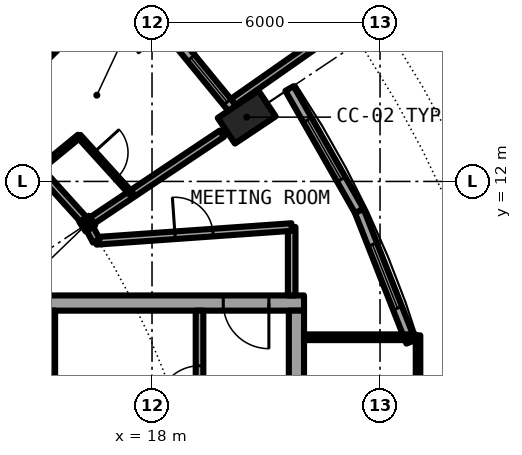
"""IFC4 building model, lengths in metres.
Left out: names, types, materials, properties, quantities, classifications, styles, units other than length and angle.
Written with IfcOpenShell. Run it as: python <this file> out.ifc"""

import sys

from ifc_helpers import new_model, si_unit, direction, frame, frame_2d, origin, origin_2d, place, context, subcontext, project, spatial, rectangle, hollow_circle, i_section, extrude, element, fill, save


model = new_model("IFC4")
c1 = context("Model", 3, precision=1e-05, world=origin(), true_north=direction((0.0, 1.0)))
c2 = subcontext(c1, "Body", "Model", "MODEL_VIEW")
j1 = project(units=[si_unit("LENGTHUNIT", "METRE"), si_unit("PLANEANGLEUNIT", "RADIAN")], contexts=[c1])
p1 = place(None, origin())
s1 = spatial("IfcSite", under=j1, at=p1, CompositionType="ELEMENT")
p2 = place(p1, origin())
s2 = spatial("IfcBuilding", under=s1, at=p2, CompositionType="ELEMENT")
p3 = place(p2, frame((0.0, 0.0, 243.2)))
s3 = spatial("IfcBuildingStorey", under=s2, at=p3, CompositionType="ELEMENT", Elevation=243.2)
p4 = place(p3, frame((21.027, 14.05, 0.242), z_axis=(-0.346875102267, -0.231750495433, 0.908828570905), x_axis=(0.555530396269, -0.831496228988, 0.0)))
e1 = element("IfcColumn", 1, at=p4, inside=s3, PredefinedType="COLUMN", context=c2, shape_type="SweptSolid", body=[
    extrude(hollow_circle(Radius=0.406, WallThickness=0.03, at=origin_2d()), origin(), (0.0, 0.0, 1.0), 3.09),
])
p5 = place(p3, frame((16.297, 10.889, 0.0), z_axis=(0.0, 0.0, 1.0), x_axis=(0.831469612303, 0.55557023302, 0.0)))
e2 = element("IfcColumn", 2, at=p5, inside=s3, PredefinedType="COLUMN", context=c2, shape_type="SweptSolid", body=[
    extrude(i_section(OverallWidth=0.3, OverallDepth=0.3, WebThickness=0.011, FlangeThickness=0.019, FilletRadius=0.027, at=origin_2d()), origin(), (0.0, 0.0, 1.0), 3.05),
])
p6 = place(p3, frame((20.371, 13.611, 0.0), z_axis=(0.0, 0.0, 1.0), x_axis=(-0.634396836208, 0.773007538262, 0.0)))
e3 = element("IfcWall", 3, at=p6, inside=s3, PredefinedType="SOLIDWALL", context=c2, shape_type="SweptSolid", body=[
    extrude(rectangle(XDim=4.803, YDim=0.25, at=frame_2d((2.402, 0.0))), origin(), (0.0, 0.0, 1.0), 2.7),
])
p7 = place(p6, frame((0.62, 0.0, 0.3)))
e4 = element("IfcOpeningElement", 4, at=p7, cuts=e3, PredefinedType="OPENING", context=c2, shape_type="SweptSolid", body=[
    extrude(rectangle(XDim=1.5, YDim=2.1, at=frame_2d((0.75, 1.05))), frame((0.0, 0.135, 0.0), z_axis=(0.0, -1.0, 0.0), x_axis=(1.0, 0.0, 0.0)), (0.0, 0.0, 1.0), 0.27),
])
p8 = place(p6, frame((3.099, 0.0, 0.0)))
e5 = element("IfcOpeningElement", 5, at=p8, cuts=e3, PredefinedType="OPENING", context=c2, shape_type="SweptSolid", body=[
    extrude(rectangle(XDim=1.0, YDim=2.2, at=frame_2d((0.5, 1.1))), frame((0.0, 0.135, 0.0), z_axis=(0.0, -1.0, 0.0), x_axis=(1.0, 0.0, 0.0)), (0.0, 0.0, 1.0), 0.27),
])
p9 = place(p3, frame((20.138, 14.093, -0.03), z_axis=(0.0, 0.0, 1.0), x_axis=(0.81913764619, 0.573596998419, 0.0)))
e6 = element("IfcWall", 6, at=p9, inside=s3, PredefinedType="SOLIDWALL", context=c2, shape_type="SweptSolid", body=[
    extrude(rectangle(XDim=2.92, YDim=0.2, at=frame_2d((1.46, 0.0))), origin(), (0.0, 0.0, 1.0), 2.73),
])
p10 = place(p3, frame((24.809, 7.779, 0.0), z_axis=(0.0, 0.0, 1.0), x_axis=(-0.366351636034, 0.930476479432, 0.0)))
e7 = element("IfcWall", 7, at=p10, inside=s3, PredefinedType="SOLIDWALL", context=c2, shape_type="SweptSolid", body=[
    extrude(rectangle(XDim=3.705, YDim=0.25, at=frame_2d((1.852, 0.0))), origin(), (0.0, 0.0, 1.0), 2.7),
])
p11 = place(p10, frame((0.952, 0.0, 0.3)))
e8 = element("IfcOpeningElement", 8, at=p11, cuts=e7, PredefinedType="OPENING", context=c2, shape_type="SweptSolid", body=[
    extrude(rectangle(XDim=1.8, YDim=2.1, at=frame_2d((0.9, 1.05))), frame((0.0, 0.135, 0.0), z_axis=(0.0, -1.0, 0.0), x_axis=(1.0, 0.0, 0.0)), (0.0, 0.0, 1.0), 0.27),
])
p12 = place(p3, frame((23.452, 11.226, 0.0), z_axis=(0.0, 0.0, 1.0), x_axis=(-0.495031435966, 0.868875064325, 0.0)))
e9 = element("IfcWall", 9, at=p12, inside=s3, PredefinedType="SOLIDWALL", context=c2, shape_type="SweptSolid", body=[
    extrude(rectangle(XDim=3.705, YDim=0.25, at=frame_2d((1.853, 0.0))), origin(), (0.0, 0.0, 1.0), 2.7),
])
p13 = place(p12, frame((0.952, 0.0, 0.3)))
e10 = element("IfcOpeningElement", 10, at=p13, cuts=e9, PredefinedType="OPENING", context=c2, shape_type="SweptSolid", body=[
    extrude(rectangle(XDim=1.8, YDim=2.1, at=frame_2d((0.9, 1.05))), frame((0.0, 0.135, 0.0), z_axis=(0.0, -1.0, 0.0), x_axis=(1.0, 0.0, 0.0)), (0.0, 0.0, 1.0), 0.27),
])
p14 = place(p3, frame((22.0, 8.8, 0.0), z_axis=(0.0, 0.0, 1.0), x_axis=(-1.0, 0.0, 0.0)))
e11 = element("IfcWall", 11, at=p14, inside=s3, PredefinedType="SHEAR", context=c2, shape_type="SweptSolid", body=[
    extrude(rectangle(XDim=13.4, YDim=0.4, at=frame_2d((6.7, 0.0))), origin(), (0.0, 0.0, 1.0), 3.05),
])
p15 = place(p14, frame((0.925, 0.0, 0.0)))
e12 = element("IfcOpeningElement", 12, at=p15, cuts=e11, PredefinedType="OPENING", context=c2, shape_type="SweptSolid", body=[
    extrude(rectangle(XDim=1.2, YDim=2.3, at=frame_2d((0.6, 1.15))), frame((0.0, 0.21, 0.0), z_axis=(0.0, -1.0, 0.0), x_axis=(1.0, 0.0, 0.0)), (0.0, 0.0, 1.0), 0.42),
])
p16 = place(p3, frame((21.8, 8.6, 0.0), z_axis=(0.0, 0.0, 1.0), x_axis=(0.0, -1.0, 0.0)))
e13 = element("IfcWall", 13, at=p16, inside=s3, PredefinedType="SHEAR", context=c2, shape_type="SweptSolid", body=[
    extrude(rectangle(XDim=17.2, YDim=0.4, at=frame_2d((8.6, 0.0))), origin(), (0.0, 0.0, 1.0), 3.05),
])
p17 = place(p16, frame((7.7, 0.0, 0.0)))
e14 = element("IfcOpeningElement", 14, at=p17, cuts=e13, PredefinedType="OPENING", context=c2, shape_type="SweptSolid", body=[
    extrude(rectangle(XDim=1.8, YDim=2.3, at=frame_2d((0.9, 1.15))), frame((0.0, 0.21, 0.0), z_axis=(0.0, -1.0, 0.0), x_axis=(1.0, 0.0, 0.0)), (0.0, 0.0, 1.0), 0.42),
])
p18 = place(p3, frame((15.325, 4.65, 0.0), z_axis=(0.0, 0.0, 1.0), x_axis=(0.0, 1.0, 0.0)))
e15 = element("IfcWall", 15, at=p18, inside=s3, PredefinedType="SHEAR", context=c2, shape_type="SweptSolid", body=[
    extrude(rectangle(XDim=3.95, YDim=0.25, at=frame_2d((1.975, 0.0))), origin(), (0.0, 0.0, 1.0), 3.05),
])
p19 = place(p18, frame((1.375, 0.0, 0.0)))
e16 = element("IfcOpeningElement", 16, at=p19, cuts=e15, PredefinedType="OPENING", context=c2, shape_type="SweptSolid", body=[
    extrude(rectangle(XDim=1.2, YDim=2.3, at=frame_2d((0.6, 1.15))), frame((0.0, 0.135, 0.0), z_axis=(0.0, -1.0, 0.0), x_axis=(1.0, 0.0, 0.0)), (0.0, 0.0, 1.0), 0.27),
])
p20 = place(p3, frame((19.25, 1.575, 0.0), z_axis=(0.0, 0.0, 1.0), x_axis=(0.0, 1.0, 0.0)))
e17 = element("IfcWall", 17, at=p20, inside=s3, PredefinedType="SOLIDWALL", context=c2, shape_type="SweptSolid", body=[
    extrude(rectangle(XDim=7.025, YDim=0.2, at=frame_2d((3.513, 0.0))), origin(), (0.0, 0.0, 1.0), 2.7),
])
p21 = place(p20, frame((4.475, 0.0, 0.0)))
e18 = element("IfcOpeningElement", 18, at=p21, cuts=e17, PredefinedType="OPENING", context=c2, shape_type="SweptSolid", body=[
    extrude(rectangle(XDim=1.1, YDim=2.3, at=frame_2d((0.55, 1.15))), frame((0.0, 0.11, 0.0), z_axis=(0.0, -1.0, 0.0), x_axis=(1.0, 0.0, 0.0)), (0.0, 0.0, 1.0), 0.22),
])
p22 = place(p3, frame((22.0, 7.9, 0.0), z_axis=(0.0, 0.0, 1.0), x_axis=(1.0, 0.0, 0.0)))
e19 = element("IfcWall", 19, at=p22, inside=s3, PredefinedType="PARTITIONING", context=c2, shape_type="SweptSolid", body=[
    extrude(rectangle(XDim=2.94, YDim=0.15, at=frame_2d((1.47, 0.0))), origin(), (0.0, 0.0, 1.0), 2.7),
])
p23 = place(p3, frame((25.0, -7.95, 0.0), z_axis=(0.0, 0.0, 1.0), x_axis=(0.0, 1.0, 0.0)))
e20 = element("IfcWall", 20, at=p23, inside=s3, PredefinedType="PARTITIONING", context=c2, shape_type="SweptSolid", body=[
    extrude(rectangle(XDim=15.9, YDim=0.12, at=frame_2d((7.95, 0.0))), origin(), (0.0, 0.0, 1.0), 2.7),
])
p24 = place(p23, frame((0.95, 0.0, 0.1)))
e21 = element("IfcOpeningElement", 21, at=p24, cuts=e20, PredefinedType="OPENING", context=c2, shape_type="SweptSolid", body=[
    extrude(rectangle(XDim=14.0, YDim=2.35, at=frame_2d((7.0, 1.175))), frame((0.0, 0.07, 0.0), z_axis=(0.0, -1.0, 0.0), x_axis=(1.0, 0.0, 0.0)), (0.0, 0.0, 1.0), 0.14),
])
p25 = place(p3, frame((21.675, 9.0, 0.0), z_axis=(0.0, 0.0, 1.0), x_axis=(0.0, 1.0, 0.0)))
e22 = element("IfcWall", 22, at=p25, inside=s3, PredefinedType="PARTITIONING", context=c2, shape_type="SweptSolid", body=[
    extrude(rectangle(XDim=1.8, YDim=0.2, at=frame_2d((0.9, 0.0))), origin(), (0.0, 0.0, 1.0), 2.7),
])
p26 = place(p3, frame((12.433, 15.152, 0.0), z_axis=(0.0, 0.0, 1.0), x_axis=(0.634362058107, 0.77303607887, 0.0)))
e23 = element("IfcWall", 23, at=p26, inside=s3, PredefinedType="PARTITIONING", context=c2, shape_type="SweptSolid", body=[
    extrude(rectangle(XDim=4.775, YDim=0.2, at=frame_2d((2.387, 0.0))), origin(), (0.0, 0.0, 1.0), 2.7),
])
p27 = place(p3, frame((14.702, 14.711, 0.0), z_axis=(0.0, 0.0, 1.0), x_axis=(0.706833687935, 0.707379769007, 0.0)))
e24 = element("IfcWall", 24, at=p27, inside=s3, PredefinedType="PARTITIONING", context=c2, shape_type="SweptSolid", body=[
    extrude(rectangle(XDim=3.577, YDim=0.1, at=frame_2d((1.788, 0.0))), origin(), (0.0, 0.0, 1.0), 2.7),
])
p28 = place(p27, frame((1.338, 0.0, 0.0)))
e25 = element("IfcOpeningElement", 25, at=p28, cuts=e24, PredefinedType="OPENING", context=c2, shape_type="SweptSolid", body=[
    extrude(rectangle(XDim=0.9, YDim=2.3, at=frame_2d((0.45, 1.15))), frame((0.0, 0.06, 0.0), z_axis=(0.0, -1.0, 0.0), x_axis=(1.0, 0.0, 0.0)), (0.0, 0.0, 1.0), 0.12),
])
p29 = place(p3, frame((15.009, 12.31, 0.0), z_axis=(0.0, 0.0, 1.0), x_axis=(0.773321325714, 0.634014295735, 0.0)))
e26 = element("IfcWall", 26, at=p29, inside=s3, PredefinedType="PARTITIONING", context=c2, shape_type="SweptSolid", body=[
    extrude(rectangle(XDim=1.386, YDim=0.1, at=frame_2d((0.693, 0.0))), origin(), (0.0, 0.0, 1.0), 2.7),
])
p30 = place(p3, frame((16.422, 10.972, 0.0), z_axis=(0.0, 0.0, 1.0), x_axis=(0.831263363926, 0.555878781566, 0.0)))
e27 = element("IfcWall", 27, at=p30, inside=s3, PredefinedType="PARTITIONING", context=c2, shape_type="SweptSolid", body=[
    extrude(rectangle(XDim=4.109, YDim=0.2, at=frame_2d((2.055, 0.0))), origin(), (0.0, 0.0, 1.0), 2.7),
])
p31 = place(p3, frame((16.535, 10.437, 0.0), z_axis=(0.0, 0.0, 1.0), x_axis=(0.997515141784, 0.070452408845, 0.0)))
e28 = element("IfcWall", 28, at=p31, inside=s3, PredefinedType="PARTITIONING", context=c2, shape_type="SweptSolid", body=[
    extrude(rectangle(XDim=5.153, YDim=0.2, at=frame_2d((2.576, 0.0))), origin(), (0.0, 0.0, 1.0), 2.7),
])
p32 = place(p31, frame((2.076, 0.0, 0.0)))
e29 = element("IfcOpeningElement", 29, at=p32, cuts=e28, PredefinedType="OPENING", context=c2, shape_type="SweptSolid", body=[
    extrude(rectangle(XDim=1.0, YDim=2.3, at=frame_2d((0.5, 1.15))), frame((0.0, 0.11, 0.0), z_axis=(0.0, -1.0, 0.0), x_axis=(1.0, 0.0, 0.0)), (0.0, 0.0, 1.0), 0.22),
])
p33 = place(p3, frame((12.434, 15.151, 0.0), z_axis=(0.0, 0.0, 1.0), x_axis=(0.671619657805, -0.740896102871, 0.0)))
e30 = element("IfcWall", 30, at=p33, inside=s3, PredefinedType="PARTITIONING", context=c2, shape_type="SweptSolid", body=[
    extrude(rectangle(XDim=5.6, YDim=0.2, at=frame_2d((2.8, 0.0))), origin(), (0.0, 0.0, 1.0), 2.45),
])
p34 = place(p33, frame((1.417, 0.0, 0.0)))
e31 = element("IfcOpeningElement", 31, at=p34, cuts=e30, PredefinedType="OPENING", context=c2, shape_type="SweptSolid", body=[
    extrude(rectangle(XDim=1.0, YDim=2.3, at=frame_2d((0.5, 1.15))), frame((0.0, 0.11, 0.0), z_axis=(0.0, -1.0, 0.0), x_axis=(1.0, 0.0, 0.0)), (0.0, 0.0, 1.0), 0.22),
])
p35 = place(p3, frame((16.367, 10.756, 0.0), z_axis=(0.0, 0.0, 1.0), x_axis=(0.465802239822, -0.884888848035, 0.0)))
e32 = element("IfcWall", 32, at=p35, inside=s3, PredefinedType="PARTITIONING", context=c2, shape_type="SweptSolid", body=[
    extrude(rectangle(XDim=0.361, YDim=0.2, at=frame_2d((0.18, 0.0))), origin(), (0.0, 0.0, 1.0), 2.7),
])
p36 = place(p3, frame((16.081, 13.189, 0.0), z_axis=(0.0, 0.0, 1.0), x_axis=(0.671678456097, -0.74084279818, 0.0)))
e33 = element("IfcWall", 33, at=p36, inside=s3, PredefinedType="PARTITIONING", context=c2, shape_type="SweptSolid", body=[
    extrude(rectangle(XDim=2.054, YDim=0.1, at=frame_2d((1.027, 0.0))), origin(), (0.0, 0.0, 1.0), 2.7),
])
p37 = place(p36, frame((0.577, 0.0, 0.0)))
e34 = element("IfcOpeningElement", 34, at=p37, cuts=e33, PredefinedType="OPENING", context=c2, shape_type="SweptSolid", body=[
    extrude(rectangle(XDim=0.9, YDim=2.3, at=frame_2d((0.45, 1.15))), frame((0.0, 0.06, 0.0), z_axis=(0.0, -1.0, 0.0), x_axis=(1.0, 0.0, 0.0)), (0.0, 0.0, 1.0), 0.12),
])
p38 = place(p7, origin())
e35 = element("IfcWindow", 35, at=p38, inside=s3, PartitioningType="SINGLE_PANEL", PredefinedType="WINDOW", context=c2, shape_type="SweptSolid", body=[
    extrude(rectangle(XDim=1.5, YDim=2.1, at=frame_2d((0.75, 1.05))), frame((0.0, 0.03, 0.0), z_axis=(0.0, -1.0, 0.0), x_axis=(1.0, 0.0, 0.0)), (0.0, 0.0, 1.0), 0.06),
])
fill(e4, e35)
p39 = place(p11, origin())
e36 = element("IfcWindow", 36, at=p39, inside=s3, PartitioningType="SINGLE_PANEL", PredefinedType="WINDOW", context=c2, shape_type="SweptSolid", body=[
    extrude(rectangle(XDim=1.8, YDim=2.1, at=frame_2d((0.9, 1.05))), frame((0.0, 0.03, 0.0), z_axis=(0.0, -1.0, 0.0), x_axis=(1.0, 0.0, 0.0)), (0.0, 0.0, 1.0), 0.06),
])
fill(e8, e36)
p40 = place(p13, origin())
e37 = element("IfcWindow", 37, at=p40, inside=s3, PartitioningType="SINGLE_PANEL", PredefinedType="WINDOW", context=c2, shape_type="SweptSolid", body=[
    extrude(rectangle(XDim=1.8, YDim=2.1, at=frame_2d((0.9, 1.05))), frame((0.0, 0.03, 0.0), z_axis=(0.0, -1.0, 0.0), x_axis=(1.0, 0.0, 0.0)), (0.0, 0.0, 1.0), 0.06),
])
fill(e10, e37)
p41 = place(p21, origin())
e38 = element("IfcDoor", 38, at=p41, inside=s3, OperationType="SINGLE_SWING_LEFT", PredefinedType="DOOR", context=c2, shape_type="SweptSolid", body=[
    extrude(rectangle(XDim=1.1, YDim=2.3, at=frame_2d((0.55, 1.15))), frame((0.0, 0.025, 0.0), z_axis=(0.0, -1.0, 0.0), x_axis=(1.0, 0.0, 0.0)), (0.0, 0.0, 1.0), 0.05),
])
fill(e18, e38)
p42 = place(p15, origin())
e39 = element("IfcDoor", 39, at=p42, inside=s3, OperationType="SINGLE_SWING_RIGHT", PredefinedType="DOOR", context=c2, shape_type="SweptSolid", body=[
    extrude(rectangle(XDim=1.2, YDim=2.3, at=frame_2d((0.6, 1.15))), frame((0.0, 0.025, 0.0), z_axis=(0.0, -1.0, 0.0), x_axis=(1.0, 0.0, 0.0)), (0.0, 0.0, 1.0), 0.05),
])
fill(e12, e39)
p43 = place(p24, origin())
e40 = element("IfcWindow", 40, at=p43, inside=s3, PartitioningType="SINGLE_PANEL", PredefinedType="WINDOW", context=c2, shape_type="SweptSolid", body=[
    extrude(rectangle(XDim=14.0, YDim=2.35, at=frame_2d((7.0, 1.175))), frame((0.0, 0.03, 0.0), z_axis=(0.0, -1.0, 0.0), x_axis=(1.0, 0.0, 0.0)), (0.0, 0.0, 1.0), 0.06),
])
fill(e21, e40)
p44 = place(p37, origin())
e41 = element("IfcDoor", 41, at=p44, inside=s3, OperationType="SINGLE_SWING_RIGHT", PredefinedType="DOOR", context=c2, shape_type="SweptSolid", body=[
    extrude(rectangle(XDim=0.9, YDim=2.3, at=frame_2d((0.45, 1.15))), frame((0.0, 0.025, 0.0), z_axis=(0.0, -1.0, 0.0), x_axis=(1.0, 0.0, 0.0)), (0.0, 0.0, 1.0), 0.05),
])
fill(e34, e41)
p45 = place(p32, origin())
e42 = element("IfcDoor", 42, at=p45, inside=s3, OperationType="SINGLE_SWING_LEFT", PredefinedType="DOOR", context=c2, shape_type="SweptSolid", body=[
    extrude(rectangle(XDim=1.0, YDim=2.3, at=frame_2d((0.5, 1.15))), frame((0.0, 0.025, 0.0), z_axis=(0.0, -1.0, 0.0), x_axis=(1.0, 0.0, 0.0)), (0.0, 0.0, 1.0), 0.05),
])
fill(e29, e42)
save(model, sys.argv[1])
